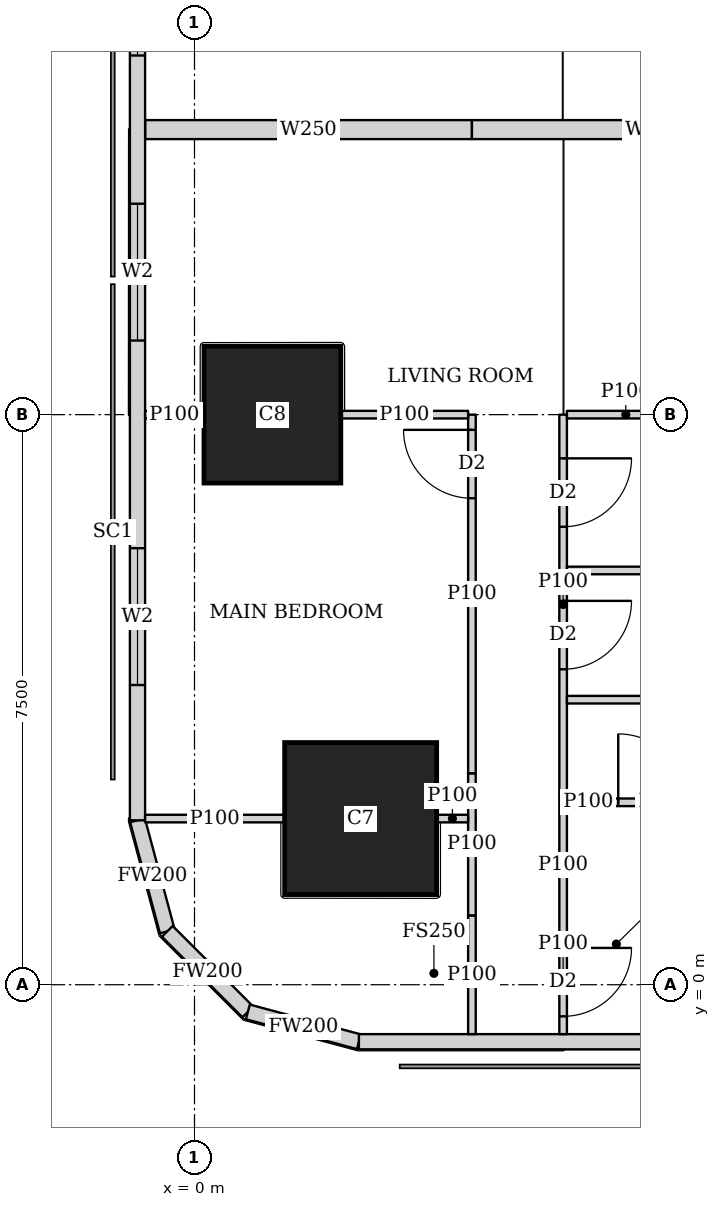
"""IFC4 building model, lengths in metres.
Left out: names, types, materials, properties, quantities, classifications, styles, units other than length and angle.
Written with IfcOpenShell. Run it as: python <this file> out.ifc"""

import sys

from ifc_helpers import new_model, si_unit, direction, frame, frame_2d, origin, origin_2d, place, context, subcontext, project, spatial, rectangle, extrude, element, fill, save


model = new_model("IFC4")
c1 = context("Model", 3, precision=1e-05, world=origin(), true_north=direction((0.0, 1.0)))
c2 = subcontext(c1, "Body", "Model", "MODEL_VIEW")
j1 = project(units=[si_unit("LENGTHUNIT", "METRE"), si_unit("PLANEANGLEUNIT", "RADIAN")], contexts=[c1])
p1 = place(None, origin())
s1 = spatial("IfcSite", under=j1, at=p1, CompositionType="ELEMENT")
p2 = place(p1, origin())
s2 = spatial("IfcBuilding", under=s1, at=p2, CompositionType="ELEMENT")
p3 = place(p2, frame((0.0, 0.0, 139.55)))
s3 = spatial("IfcBuildingStorey", under=s2, at=p3, CompositionType="ELEMENT", Elevation=139.55)
p4 = place(p3, frame((2.186, 2.186, 0.0), z_axis=(0.0, 0.0, 1.0), x_axis=(1.0, 0.0, 0.0)))
e1 = element("IfcColumn", 1, at=p4, inside=s3, PredefinedType="COLUMN", context=c2, shape_type="SweptSolid", body=[
    extrude(rectangle(XDim=2.0, YDim=2.0, at=origin_2d()), origin(), (0.0, 0.0, 1.0), 3.75),
])
p5 = place(p3, frame((1.025, 7.5, 0.0), z_axis=(0.0, 0.0, 1.0), x_axis=(1.0, 0.0, 0.0)))
e2 = element("IfcColumn", 2, at=p5, inside=s3, PredefinedType="COLUMN", context=c2, shape_type="SweptSolid", body=[
    extrude(rectangle(XDim=1.8, YDim=1.8, at=origin_2d()), origin(), (0.0, 0.0, 1.0), 3.75),
])
p6 = place(p3, frame((2.163, -0.75, 0.0), z_axis=(0.0, 0.0, 1.0), x_axis=(1.0, 0.0, 0.0)))
e3 = element("IfcWall", 3, at=p6, inside=s3, PredefinedType="SOLIDWALL", context=c2, shape_type="SweptSolid", body=[
    extrude(rectangle(XDim=45.628, YDim=0.2, at=frame_2d((22.814, 0.0))), origin(), (0.0, 0.0, 1.0), 3.5),
])
p7 = place(p6, frame((9.537, 0.0, 0.9)))
e4 = element("IfcOpeningElement", 4, at=p7, cuts=e3, PredefinedType="OPENING", context=c2, shape_type="SweptSolid", body=[
    extrude(rectangle(XDim=1.8, YDim=1.5, at=frame_2d((0.9, 0.75))), frame((0.0, 0.11, 0.0), z_axis=(0.0, -1.0, 0.0), x_axis=(1.0, 0.0, 0.0)), (0.0, 0.0, 1.0), 0.22),
])
p8 = place(p6, frame((13.137, 0.0, 0.9)))
e5 = element("IfcOpeningElement", 5, at=p8, cuts=e3, PredefinedType="OPENING", context=c2, shape_type="SweptSolid", body=[
    extrude(rectangle(XDim=1.8, YDim=1.5, at=frame_2d((0.9, 0.75))), frame((0.0, 0.11, 0.0), z_axis=(0.0, -1.0, 0.0), x_axis=(1.0, 0.0, 0.0)), (0.0, 0.0, 1.0), 0.22),
])
p9 = place(p6, frame((16.737, 0.0, 0.9)))
e6 = element("IfcOpeningElement", 6, at=p9, cuts=e3, PredefinedType="OPENING", context=c2, shape_type="SweptSolid", body=[
    extrude(rectangle(XDim=1.8, YDim=1.5, at=frame_2d((0.9, 0.75))), frame((0.0, 0.11, 0.0), z_axis=(0.0, -1.0, 0.0), x_axis=(1.0, 0.0, 0.0)), (0.0, 0.0, 1.0), 0.22),
])
p10 = place(p6, frame((20.337, 0.0, 0.9)))
e7 = element("IfcOpeningElement", 7, at=p10, cuts=e3, PredefinedType="OPENING", context=c2, shape_type="SweptSolid", body=[
    extrude(rectangle(XDim=1.8, YDim=1.5, at=frame_2d((0.9, 0.75))), frame((0.0, 0.11, 0.0), z_axis=(0.0, -1.0, 0.0), x_axis=(1.0, 0.0, 0.0)), (0.0, 0.0, 1.0), 0.22),
])
p11 = place(p6, frame((23.937, 0.0, 0.9)))
e8 = element("IfcOpeningElement", 8, at=p11, cuts=e3, PredefinedType="OPENING", context=c2, shape_type="SweptSolid", body=[
    extrude(rectangle(XDim=1.8, YDim=1.5, at=frame_2d((0.9, 0.75))), frame((0.0, 0.11, 0.0), z_axis=(0.0, -1.0, 0.0), x_axis=(1.0, 0.0, 0.0)), (0.0, 0.0, 1.0), 0.22),
])
p12 = place(p6, frame((27.537, 0.0, 0.9)))
e9 = element("IfcOpeningElement", 9, at=p12, cuts=e3, PredefinedType="OPENING", context=c2, shape_type="SweptSolid", body=[
    extrude(rectangle(XDim=1.8, YDim=1.5, at=frame_2d((0.9, 0.75))), frame((0.0, 0.11, 0.0), z_axis=(0.0, -1.0, 0.0), x_axis=(1.0, 0.0, 0.0)), (0.0, 0.0, 1.0), 0.22),
])
p13 = place(p6, frame((31.137, 0.0, 0.9)))
e10 = element("IfcOpeningElement", 10, at=p13, cuts=e3, PredefinedType="OPENING", context=c2, shape_type="SweptSolid", body=[
    extrude(rectangle(XDim=1.8, YDim=1.5, at=frame_2d((0.9, 0.75))), frame((0.0, 0.11, 0.0), z_axis=(0.0, -1.0, 0.0), x_axis=(1.0, 0.0, 0.0)), (0.0, 0.0, 1.0), 0.22),
])
p14 = place(p6, frame((34.737, 0.0, 0.9)))
e11 = element("IfcOpeningElement", 11, at=p14, cuts=e3, PredefinedType="OPENING", context=c2, shape_type="SweptSolid", body=[
    extrude(rectangle(XDim=1.8, YDim=1.5, at=frame_2d((0.9, 0.75))), frame((0.0, 0.11, 0.0), z_axis=(0.0, -1.0, 0.0), x_axis=(1.0, 0.0, 0.0)), (0.0, 0.0, 1.0), 0.22),
])
p15 = place(p3, frame((-0.75, 42.837, 0.0), z_axis=(0.0, 0.0, 1.0), x_axis=(0.0, -1.0, 0.0)))
e12 = element("IfcWall", 12, at=p15, inside=s3, PredefinedType="SOLIDWALL", context=c2, shape_type="SweptSolid", body=[
    extrude(rectangle(XDim=40.674, YDim=0.2, at=frame_2d((20.337, 0.0))), origin(), (0.0, 0.0, 1.0), 3.5),
])
p16 = place(p15, frame((1.78, 0.0, 0.9)))
e13 = element("IfcOpeningElement", 13, at=p16, cuts=e12, PredefinedType="OPENING", context=c2, shape_type="SweptSolid", body=[
    extrude(rectangle(XDim=1.8, YDim=1.5, at=frame_2d((0.9, 0.75))), frame((0.0, 0.11, 0.0), z_axis=(0.0, -1.0, 0.0), x_axis=(1.0, 0.0, 0.0)), (0.0, 0.0, 1.0), 0.22),
])
p17 = place(p15, frame((6.312, 0.0, 0.9)))
e14 = element("IfcOpeningElement", 14, at=p17, cuts=e12, PredefinedType="OPENING", context=c2, shape_type="SweptSolid", body=[
    extrude(rectangle(XDim=1.8, YDim=1.5, at=frame_2d((0.9, 0.75))), frame((0.0, 0.11, 0.0), z_axis=(0.0, -1.0, 0.0), x_axis=(1.0, 0.0, 0.0)), (0.0, 0.0, 1.0), 0.22),
])
p18 = place(p15, frame((10.062, 0.0, 0.9)))
e15 = element("IfcOpeningElement", 15, at=p18, cuts=e12, PredefinedType="OPENING", context=c2, shape_type="SweptSolid", body=[
    extrude(rectangle(XDim=1.8, YDim=1.5, at=frame_2d((0.9, 0.75))), frame((0.0, 0.11, 0.0), z_axis=(0.0, -1.0, 0.0), x_axis=(1.0, 0.0, 0.0)), (0.0, 0.0, 1.0), 0.22),
])
p19 = place(p15, frame((13.812, 0.0, 0.9)))
e16 = element("IfcOpeningElement", 16, at=p19, cuts=e12, PredefinedType="OPENING", context=c2, shape_type="SweptSolid", body=[
    extrude(rectangle(XDim=1.8, YDim=1.5, at=frame_2d((0.9, 0.75))), frame((0.0, 0.11, 0.0), z_axis=(0.0, -1.0, 0.0), x_axis=(1.0, 0.0, 0.0)), (0.0, 0.0, 1.0), 0.22),
])
p20 = place(p15, frame((17.562, 0.0, 0.9)))
e17 = element("IfcOpeningElement", 17, at=p20, cuts=e12, PredefinedType="OPENING", context=c2, shape_type="SweptSolid", body=[
    extrude(rectangle(XDim=1.8, YDim=1.5, at=frame_2d((0.9, 0.75))), frame((0.0, 0.11, 0.0), z_axis=(0.0, -1.0, 0.0), x_axis=(1.0, 0.0, 0.0)), (0.0, 0.0, 1.0), 0.22),
])
p21 = place(p15, frame((21.312, 0.0, 0.9)))
e18 = element("IfcOpeningElement", 18, at=p21, cuts=e12, PredefinedType="OPENING", context=c2, shape_type="SweptSolid", body=[
    extrude(rectangle(XDim=1.8, YDim=1.5, at=frame_2d((0.9, 0.75))), frame((0.0, 0.11, 0.0), z_axis=(0.0, -1.0, 0.0), x_axis=(1.0, 0.0, 0.0)), (0.0, 0.0, 1.0), 0.22),
])
p22 = place(p15, frame((25.062, 0.0, 0.9)))
e19 = element("IfcOpeningElement", 19, at=p22, cuts=e12, PredefinedType="OPENING", context=c2, shape_type="SweptSolid", body=[
    extrude(rectangle(XDim=1.8, YDim=1.5, at=frame_2d((0.9, 0.75))), frame((0.0, 0.11, 0.0), z_axis=(0.0, -1.0, 0.0), x_axis=(1.0, 0.0, 0.0)), (0.0, 0.0, 1.0), 0.22),
])
p23 = place(p15, frame((28.812, 0.0, 0.9)))
e20 = element("IfcOpeningElement", 20, at=p23, cuts=e12, PredefinedType="OPENING", context=c2, shape_type="SweptSolid", body=[
    extrude(rectangle(XDim=1.8, YDim=1.5, at=frame_2d((0.9, 0.75))), frame((0.0, 0.11, 0.0), z_axis=(0.0, -1.0, 0.0), x_axis=(1.0, 0.0, 0.0)), (0.0, 0.0, 1.0), 0.22),
])
p24 = place(p15, frame((32.562, 0.0, 0.9)))
e21 = element("IfcOpeningElement", 21, at=p24, cuts=e12, PredefinedType="OPENING", context=c2, shape_type="SweptSolid", body=[
    extrude(rectangle(XDim=1.8, YDim=1.5, at=frame_2d((0.9, 0.75))), frame((0.0, 0.11, 0.0), z_axis=(0.0, -1.0, 0.0), x_axis=(1.0, 0.0, 0.0)), (0.0, 0.0, 1.0), 0.22),
])
p25 = place(p15, frame((37.094, 0.0, 0.9)))
e22 = element("IfcOpeningElement", 22, at=p25, cuts=e12, PredefinedType="OPENING", context=c2, shape_type="SweptSolid", body=[
    extrude(rectangle(XDim=1.8, YDim=1.5, at=frame_2d((0.9, 0.75))), frame((0.0, 0.11, 0.0), z_axis=(0.0, -1.0, 0.0), x_axis=(1.0, 0.0, 0.0)), (0.0, 0.0, 1.0), 0.22),
])
p26 = place(p3, frame((-0.75, 2.163, 0.0), z_axis=(0.0, 0.0, 1.0), x_axis=(0.259168954497, -0.965832000415, 0.0)))
e23 = element("IfcWall", 23, at=p26, inside=s3, PredefinedType="SOLIDWALL", context=c2, shape_type="SweptSolid", body=[
    extrude(rectangle(XDim=1.513, YDim=0.2, at=frame_2d((0.756, 0.0))), origin(), (0.0, 0.0, 1.0), 3.5),
])
p27 = place(p3, frame((-0.358, 0.702, 0.0), z_axis=(0.0, 0.0, 1.0), x_axis=(0.707106781187, -0.707106781187, 0.0)))
e24 = element("IfcWall", 24, at=p27, inside=s3, PredefinedType="SOLIDWALL", context=c2, shape_type="SweptSolid", body=[
    extrude(rectangle(XDim=1.499, YDim=0.2, at=frame_2d((0.75, 0.0))), origin(), (0.0, 0.0, 1.0), 3.5),
])
p28 = place(p3, frame((0.702, -0.358, 0.0), z_axis=(0.0, 0.0, 1.0), x_axis=(0.965832000415, -0.259168954497, 0.0)))
e25 = element("IfcWall", 25, at=p28, inside=s3, PredefinedType="SOLIDWALL", context=c2, shape_type="SweptSolid", body=[
    extrude(rectangle(XDim=1.513, YDim=0.2, at=frame_2d((0.756, 0.0))), origin(), (0.0, 0.0, 1.0), 3.5),
])
p29 = place(p3, frame((3.65, -0.65, 0.0), z_axis=(0.0, 0.0, 1.0), x_axis=(0.0, 1.0, 0.0)))
e26 = element("IfcWall", 26, at=p29, inside=s3, PredefinedType="PARTITIONING", context=c2, shape_type="SweptSolid", body=[
    extrude(rectangle(XDim=1.562, YDim=0.1, at=frame_2d((0.781, 0.0))), origin(), (0.0, 0.0, 1.0), 3.5),
])
p30 = place(p3, frame((3.65, 0.912, 0.0), z_axis=(0.0, 0.0, 1.0), x_axis=(0.0, 1.0, 0.0)))
e27 = element("IfcWall", 27, at=p30, inside=s3, PredefinedType="PARTITIONING", context=c2, shape_type="SweptSolid", body=[
    extrude(rectangle(XDim=1.87, YDim=0.1, at=frame_2d((0.935, 0.0))), origin(), (0.0, 0.0, 1.0), 2.1),
])
p31 = place(p3, frame((3.65, 2.782, 0.0), z_axis=(0.0, 0.0, 1.0), x_axis=(0.0, 1.0, 0.0)))
e28 = element("IfcWall", 28, at=p31, inside=s3, PredefinedType="PARTITIONING", context=c2, shape_type="SweptSolid", body=[
    extrude(rectangle(XDim=4.718, YDim=0.1, at=frame_2d((2.359, 0.0))), origin(), (0.0, 0.0, 1.0), 3.5),
])
p32 = place(p31, frame((3.618, 0.0, 0.0)))
e29 = element("IfcOpeningElement", 29, at=p32, cuts=e28, PredefinedType="OPENING", context=c2, shape_type="SweptSolid", body=[
    extrude(rectangle(XDim=0.9, YDim=2.1, at=frame_2d((0.45, 1.05))), frame((0.0, 0.06, 0.0), z_axis=(0.0, -1.0, 0.0), x_axis=(1.0, 0.0, 0.0)), (0.0, 0.0, 1.0), 0.12),
])
p33 = place(p3, frame((4.85, -0.65, 0.0), z_axis=(0.0, 0.0, 1.0), x_axis=(0.0, 1.0, 0.0)))
e30 = element("IfcWall", 30, at=p33, inside=s3, PredefinedType="PARTITIONING", context=c2, shape_type="SweptSolid", body=[
    extrude(rectangle(XDim=1.284, YDim=0.1, at=frame_2d((0.642, 0.0))), origin(), (0.0, 0.0, 1.0), 3.5),
])
p34 = place(p33, frame((0.234, 0.0, 0.0)))
e31 = element("IfcOpeningElement", 31, at=p34, cuts=e30, PredefinedType="OPENING", context=c2, shape_type="SweptSolid", body=[
    extrude(rectangle(XDim=0.9, YDim=2.1, at=frame_2d((0.45, 1.05))), frame((0.0, 0.06, 0.0), z_axis=(0.0, -1.0, 0.0), x_axis=(1.0, 0.0, 0.0)), (0.0, 0.0, 1.0), 0.12),
])
p35 = place(p3, frame((4.85, 0.634, 0.0), z_axis=(0.0, 0.0, 1.0), x_axis=(0.0, 1.0, 0.0)))
e32 = element("IfcWall", 32, at=p35, inside=s3, PredefinedType="PARTITIONING", context=c2, shape_type="SweptSolid", body=[
    extrude(rectangle(XDim=1.871, YDim=0.1, at=frame_2d((0.936, 0.0))), origin(), (0.0, 0.0, 1.0), 2.1),
])
p36 = place(p3, frame((4.85, 2.505, 0.0), z_axis=(0.0, 0.0, 1.0), x_axis=(0.0, 1.0, 0.0)))
e33 = element("IfcWall", 33, at=p36, inside=s3, PredefinedType="PARTITIONING", context=c2, shape_type="SweptSolid", body=[
    extrude(rectangle(XDim=4.995, YDim=0.1, at=frame_2d((2.498, 0.0))), origin(), (0.0, 0.0, 1.0), 3.5),
])
p37 = place(p36, frame((3.52, 0.0, 0.0)))
e34 = element("IfcOpeningElement", 34, at=p37, cuts=e33, PredefinedType="OPENING", context=c2, shape_type="SweptSolid", body=[
    extrude(rectangle(XDim=0.9, YDim=2.1, at=frame_2d((0.45, 1.05))), frame((0.0, 0.06, 0.0), z_axis=(0.0, -1.0, 0.0), x_axis=(1.0, 0.0, 0.0)), (0.0, 0.0, 1.0), 0.12),
])
p38 = place(p36, frame((1.645, 0.0, 0.0)))
e35 = element("IfcOpeningElement", 35, at=p38, cuts=e33, PredefinedType="OPENING", context=c2, shape_type="SweptSolid", body=[
    extrude(rectangle(XDim=0.9, YDim=2.1, at=frame_2d((0.45, 1.05))), frame((0.0, 0.06, 0.0), z_axis=(0.0, -1.0, 0.0), x_axis=(1.0, 0.0, 0.0)), (0.0, 0.0, 1.0), 0.12),
])
p39 = place(p3, frame((-0.65, 2.186, 0.0), z_axis=(0.0, 0.0, 1.0), x_axis=(1.0, 0.0, 0.0)))
e36 = element("IfcWall", 36, at=p39, inside=s3, PredefinedType="PARTITIONING", context=c2, shape_type="SweptSolid", body=[
    extrude(rectangle(XDim=1.835, YDim=0.1, at=frame_2d((0.917, 0.0))), origin(), (0.0, 0.0, 1.0), 3.5),
])
p40 = place(p3, frame((3.187, 2.186, 0.0), z_axis=(0.0, 0.0, 1.0), x_axis=(1.0, 0.0, 0.0)))
e37 = element("IfcWall", 37, at=p40, inside=s3, PredefinedType="PARTITIONING", context=c2, shape_type="SweptSolid", body=[
    extrude(rectangle(XDim=0.413, YDim=0.1, at=frame_2d((0.207, 0.0))), origin(), (0.0, 0.0, 1.0), 2.1),
])
p41 = place(p3, frame((-0.65, 7.5, 0.0), z_axis=(0.0, 0.0, 1.0), x_axis=(1.0, 0.0, 0.0)))
e38 = element("IfcWall", 38, at=p41, inside=s3, PredefinedType="PARTITIONING", context=c2, shape_type="SweptSolid", body=[
    extrude(rectangle(XDim=0.774, YDim=0.1, at=frame_2d((0.387, 0.0))), origin(), (0.0, 0.0, 1.0), 3.5),
])
p42 = place(p3, frame((1.926, 7.5, 0.0), z_axis=(0.0, 0.0, 1.0), x_axis=(1.0, 0.0, 0.0)))
e39 = element("IfcWall", 39, at=p42, inside=s3, PredefinedType="PARTITIONING", context=c2, shape_type="SweptSolid", body=[
    extrude(rectangle(XDim=1.674, YDim=0.1, at=frame_2d((0.837, 0.0))), origin(), (0.0, 0.0, 1.0), 2.1),
])
p43 = place(p3, frame((4.9, 3.75, 0.0), z_axis=(0.0, 0.0, 1.0), x_axis=(1.0, 0.0, 0.0)))
e40 = element("IfcWall", 40, at=p43, inside=s3, PredefinedType="PARTITIONING", context=c2, shape_type="SweptSolid", body=[
    extrude(rectangle(XDim=3.525, YDim=0.1, at=frame_2d((1.763, 0.0))), origin(), (0.0, 0.0, 1.0), 3.5),
])
p44 = place(p3, frame((4.9, 7.5, 0.0), z_axis=(0.0, 0.0, 1.0), x_axis=(1.0, 0.0, 0.0)))
e41 = element("IfcWall", 41, at=p44, inside=s3, PredefinedType="PARTITIONING", context=c2, shape_type="SweptSolid", body=[
    extrude(rectangle(XDim=1.549, YDim=0.1, at=frame_2d((0.774, 0.0))), origin(), (0.0, 0.0, 1.0), 3.5),
])
p45 = place(p3, frame((4.9, 5.45, 0.0), z_axis=(0.0, 0.0, 1.0), x_axis=(1.0, 0.0, 0.0)))
e42 = element("IfcWall", 42, at=p45, inside=s3, PredefinedType="PARTITIONING", context=c2, shape_type="SweptSolid", body=[
    extrude(rectangle(XDim=3.525, YDim=0.1, at=frame_2d((1.763, 0.0))), origin(), (0.0, 0.0, 1.0), 3.5),
])
p46 = place(p3, frame((-0.65, 11.25, 0.0), z_axis=(0.0, 0.0, 1.0), x_axis=(1.0, 0.0, 0.0)))
e43 = element("IfcWall", 43, at=p46, inside=s3, PredefinedType="SOLIDWALL", context=c2, shape_type="SweptSolid", body=[
    extrude(rectangle(XDim=4.3, YDim=0.25, at=frame_2d((2.15, 0.0))), origin(), (0.0, 0.0, 1.0), 2.1),
])
p47 = place(p3, frame((3.65, 11.25, 0.0), z_axis=(0.0, 0.0, 1.0), x_axis=(1.0, 0.0, 0.0)))
e44 = element("IfcWall", 44, at=p47, inside=s3, PredefinedType="SOLIDWALL", context=c2, shape_type="SweptSolid", body=[
    extrude(rectangle(XDim=4.775, YDim=0.25, at=frame_2d((2.388, 0.0))), origin(), (0.0, 0.0, 1.0), 3.5),
])
p48 = place(p3, frame((5.467, 2.4, 0.0), z_axis=(0.0, 0.0, 1.0), x_axis=(1.0, 0.0, 0.0)))
e45 = element("IfcWall", 45, at=p48, inside=s3, PredefinedType="PARTITIONING", context=c2, shape_type="SweptSolid", body=[
    extrude(rectangle(XDim=2.958, YDim=0.1, at=frame_2d((1.479, 0.0))), origin(), (0.0, 0.0, 1.0), 3.5),
])
p49 = place(p48, frame((0.108, 0.0, 0.0)))
e46 = element("IfcOpeningElement", 46, at=p49, cuts=e45, PredefinedType="OPENING", context=c2, shape_type="SweptSolid", body=[
    extrude(rectangle(XDim=0.9, YDim=2.1, at=frame_2d((0.45, 1.05))), frame((0.0, 0.06, 0.0), z_axis=(0.0, -1.0, 0.0), x_axis=(1.0, 0.0, 0.0)), (0.0, 0.0, 1.0), 0.12),
])
p50 = place(p3, frame((5.467, 2.4, 0.0), z_axis=(0.0, 0.0, 1.0), x_axis=(-1.0, 0.0, 0.0)))
e47 = element("IfcWall", 47, at=p50, inside=s3, PredefinedType="PARTITIONING", context=c2, shape_type="SweptSolid", body=[
    extrude(rectangle(XDim=0.567, YDim=0.1, at=frame_2d((0.284, 0.0))), origin(), (0.0, 0.0, 1.0), 2.1),
])
p51 = place(p23, origin())
e48 = element("IfcWindow", 48, at=p51, inside=s3, PartitioningType="SINGLE_PANEL", PredefinedType="WINDOW", context=c2, shape_type="SweptSolid", body=[
    extrude(rectangle(XDim=1.8, YDim=1.5, at=frame_2d((0.9, 0.75))), frame((0.0, 0.03, 0.0), z_axis=(0.0, -1.0, 0.0), x_axis=(1.0, 0.0, 0.0)), (0.0, 0.0, 1.0), 0.06),
])
fill(e20, e48)
p52 = place(p24, origin())
e49 = element("IfcWindow", 49, at=p52, inside=s3, PartitioningType="SINGLE_PANEL", PredefinedType="WINDOW", context=c2, shape_type="SweptSolid", body=[
    extrude(rectangle(XDim=1.8, YDim=1.5, at=frame_2d((0.9, 0.75))), frame((0.0, 0.03, 0.0), z_axis=(0.0, -1.0, 0.0), x_axis=(1.0, 0.0, 0.0)), (0.0, 0.0, 1.0), 0.06),
])
fill(e21, e49)
p53 = place(p25, origin())
e50 = element("IfcWindow", 50, at=p53, inside=s3, PartitioningType="SINGLE_PANEL", PredefinedType="WINDOW", context=c2, shape_type="SweptSolid", body=[
    extrude(rectangle(XDim=1.8, YDim=1.5, at=frame_2d((0.9, 0.75))), frame((0.0, 0.03, 0.0), z_axis=(0.0, -1.0, 0.0), x_axis=(1.0, 0.0, 0.0)), (0.0, 0.0, 1.0), 0.06),
])
fill(e22, e50)
p54 = place(p32, origin())
e51 = element("IfcDoor", 51, at=p54, inside=s3, OperationType="SINGLE_SWING_RIGHT", PredefinedType="DOOR", context=c2, shape_type="SweptSolid", body=[
    extrude(rectangle(XDim=0.9, YDim=2.1, at=frame_2d((0.45, 1.05))), frame((0.0, 0.025, 0.0), z_axis=(0.0, -1.0, 0.0), x_axis=(1.0, 0.0, 0.0)), (0.0, 0.0, 1.0), 0.05),
])
fill(e29, e51)
p55 = place(p37, origin())
e52 = element("IfcDoor", 52, at=p55, inside=s3, OperationType="SINGLE_SWING_LEFT", PredefinedType="DOOR", context=c2, shape_type="SweptSolid", body=[
    extrude(rectangle(XDim=0.9, YDim=2.1, at=frame_2d((0.45, 1.05))), frame((0.0, 0.025, 0.0), z_axis=(0.0, -1.0, 0.0), x_axis=(1.0, 0.0, 0.0)), (0.0, 0.0, 1.0), 0.05),
])
fill(e34, e52)
p56 = place(p34, origin())
e53 = element("IfcDoor", 53, at=p56, inside=s3, OperationType="SINGLE_SWING_LEFT", PredefinedType="DOOR", context=c2, shape_type="SweptSolid", body=[
    extrude(rectangle(XDim=0.9, YDim=2.1, at=frame_2d((0.45, 1.05))), frame((0.0, 0.025, 0.0), z_axis=(0.0, -1.0, 0.0), x_axis=(1.0, 0.0, 0.0)), (0.0, 0.0, 1.0), 0.05),
])
fill(e31, e53)
p57 = place(p38, origin())
e54 = element("IfcDoor", 54, at=p57, inside=s3, OperationType="SINGLE_SWING_LEFT", PredefinedType="DOOR", context=c2, shape_type="SweptSolid", body=[
    extrude(rectangle(XDim=0.9, YDim=2.1, at=frame_2d((0.45, 1.05))), frame((0.0, 0.025, 0.0), z_axis=(0.0, -1.0, 0.0), x_axis=(1.0, 0.0, 0.0)), (0.0, 0.0, 1.0), 0.05),
])
fill(e35, e54)
p58 = place(p49, origin())
e55 = element("IfcDoor", 55, at=p58, inside=s3, OperationType="SINGLE_SWING_LEFT", PredefinedType="DOOR", context=c2, shape_type="SweptSolid", body=[
    extrude(rectangle(XDim=0.9, YDim=2.1, at=frame_2d((0.45, 1.05))), frame((0.0, 0.025, 0.0), z_axis=(0.0, -1.0, 0.0), x_axis=(1.0, 0.0, 0.0)), (0.0, 0.0, 1.0), 0.05),
])
fill(e46, e55)
save(model, sys.argv[1])
